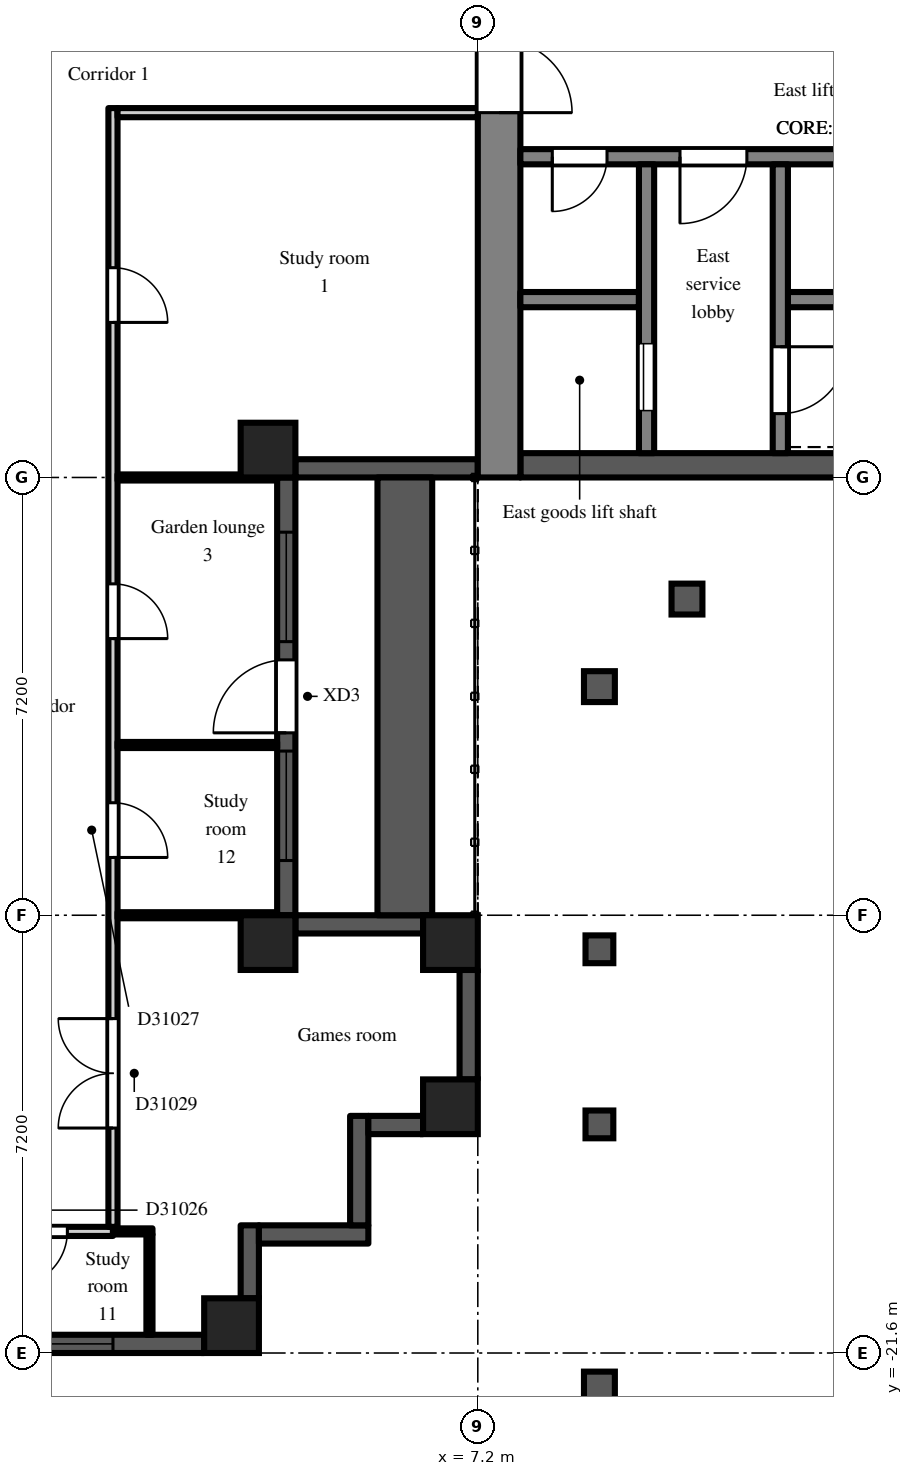
"""IFC4 building model, lengths in metres.
Left out: names, types, materials, properties, quantities, classifications, styles, units other than length and angle.
Written with IfcOpenShell. Run it as: python <this file> out.ifc"""

import sys

from ifc_helpers import new_model, si_unit, direction, frame, frame_2d, origin, origin_2d, place, context, subcontext, project, spatial, rectangle, extrude, element, fill, save


model = new_model("IFC4")
c1 = context("Model", 3, precision=1e-05, world=origin(), true_north=direction((0.0, 1.0)))
c2 = subcontext(c1, "Body", "Model", "MODEL_VIEW")
j1 = project(units=[si_unit("LENGTHUNIT", "METRE"), si_unit("PLANEANGLEUNIT", "RADIAN")], contexts=[c1])
p1 = place(None, origin())
s1 = spatial("IfcSite", under=j1, at=p1, CompositionType="ELEMENT")
p2 = place(p1, origin())
s2 = spatial("IfcBuilding", under=s1, at=p2, CompositionType="ELEMENT")
p3 = place(p2, frame((0.0, 0.0, 216.9)))
s3 = spatial("IfcBuildingStorey", under=s2, at=p3, CompositionType="ELEMENT", Elevation=216.9)
for number, where, z_axis, x_axis in (
    (1, (3.15, -21.15, 0.0), (0.0, 0.0, 1.0), (1.0, 0.0, 0.0)),
    (2, (3.75, -14.85, 0.0), (0.0, 0.0, 1.0), (1.0, 0.0, 0.0)),
    (3, (3.75, -6.75, 0.0), (0.0, 0.0, 1.0), (1.0, 0.0, 0.0)),
    (4, (6.75, -17.55, 0.0), (0.0, 0.0, 1.0), (1.0, 0.0, 0.0)),
    (5, (6.75, -14.85, 0.0), (0.0, 0.0, 1.0), (1.0, 0.0, 0.0)),
):
    element("IfcColumn", number, at=place(p3, frame(where, z_axis=z_axis, x_axis=x_axis)), inside=s3, PredefinedType="COLUMN", context=c2, shape_type="SweptSolid", body=[
        extrude(rectangle(XDim=0.9, YDim=0.9, at=origin_2d()), origin(), (0.0, 0.0, 1.0), 3.0),
    ])
p4 = place(p3, frame((-2.7, -21.45, 0.0), z_axis=(0.0, 0.0, 1.0), x_axis=(1.0, 0.0, 0.0)))
e6 = element("IfcWall", 6, at=p4, inside=s3, PredefinedType="SOLIDWALL", context=c2, shape_type="SweptSolid", body=[
    extrude(rectangle(XDim=5.4, YDim=0.3, at=frame_2d((2.7, 0.0))), origin(), (0.0, 0.0, 1.0), 2.3),
])
p5 = place(p4, frame((1.5, 0.0, 0.2)))
e7 = element("IfcOpeningElement", 7, at=p5, cuts=e6, PredefinedType="OPENING", context=c2, shape_type="SweptSolid", body=[
    extrude(rectangle(XDim=2.4, YDim=1.85, at=frame_2d((1.2, 0.925))), frame((0.0, 0.16, 0.0), z_axis=(0.0, -1.0, 0.0), x_axis=(1.0, 0.0, 0.0)), (0.0, 0.0, 1.0), 0.32),
])
p6 = place(p3, frame((3.45, -20.7, 0.0), z_axis=(0.0, 0.0, 1.0), x_axis=(0.0, 1.0, 0.0)))
e8 = element("IfcWall", 8, at=p6, inside=s3, PredefinedType="SOLIDWALL", context=c2, shape_type="SweptSolid", body=[
    extrude(rectangle(XDim=1.2, YDim=0.3, at=frame_2d((0.6, 0.0))), origin(), (0.0, 0.0, 1.0), 2.6),
])
p7 = place(p3, frame((3.6, -19.65, 0.0), z_axis=(0.0, 0.0, 1.0), x_axis=(1.0, 0.0, 0.0)))
e9 = element("IfcWall", 9, at=p7, inside=s3, PredefinedType="SOLIDWALL", context=c2, shape_type="SweptSolid", body=[
    extrude(rectangle(XDim=1.8, YDim=0.3, at=frame_2d((0.9, 0.0))), origin(), (0.0, 0.0, 1.0), 2.6),
])
p8 = place(p3, frame((5.25, -19.5, 0.0), z_axis=(0.0, 0.0, 1.0), x_axis=(0.0, 1.0, 0.0)))
e10 = element("IfcWall", 10, at=p8, inside=s3, PredefinedType="SOLIDWALL", context=c2, shape_type="SweptSolid", body=[
    extrude(rectangle(XDim=1.8, YDim=0.3, at=frame_2d((0.9, 0.0))), origin(), (0.0, 0.0, 1.0), 2.6),
])
p9 = place(p3, frame((5.4, -17.85, 0.0), z_axis=(0.0, 0.0, 1.0), x_axis=(1.0, 0.0, 0.0)))
e11 = element("IfcWall", 11, at=p9, inside=s3, PredefinedType="SOLIDWALL", context=c2, shape_type="SweptSolid", body=[
    extrude(rectangle(XDim=0.9, YDim=0.3, at=frame_2d((0.45, 0.0))), origin(), (0.0, 0.0, 1.0), 2.6),
])
p10 = place(p3, frame((7.05, -17.1, 0.0), z_axis=(0.0, 0.0, 1.0), x_axis=(0.0, 1.0, 0.0)))
e12 = element("IfcWall", 12, at=p10, inside=s3, PredefinedType="SOLIDWALL", context=c2, shape_type="SweptSolid", body=[
    extrude(rectangle(XDim=1.8, YDim=0.3, at=frame_2d((0.9, 0.0))), origin(), (0.0, 0.0, 1.0), 2.3),
])
p11 = place(p3, frame((6.3, -14.55, 0.0), z_axis=(0.0, 0.0, 1.0), x_axis=(-1.0, 0.0, 0.0)))
e13 = element("IfcWall", 13, at=p11, inside=s3, PredefinedType="SOLIDWALL", context=c2, shape_type="SweptSolid", body=[
    extrude(rectangle(XDim=2.1, YDim=0.3, at=frame_2d((1.05, 0.0))), origin(), (0.0, 0.0, 1.0), 2.3),
])
p12 = place(p3, frame((4.05, -14.4, 0.0), z_axis=(0.0, 0.0, 1.0), x_axis=(0.0, 1.0, 0.0)))
e14 = element("IfcWall", 14, at=p12, inside=s3, PredefinedType="SOLIDWALL", context=c2, shape_type="SweptSolid", body=[
    extrude(rectangle(XDim=7.2, YDim=0.3, at=frame_2d((3.6, 0.0))), origin(), (0.0, 0.0, 1.0), 2.3),
])
p13 = place(p12, frame((3.0, 0.0, 0.0)))
e15 = element("IfcOpeningElement", 15, at=p13, cuts=e14, PredefinedType="OPENING", context=c2, shape_type="SweptSolid", body=[
    extrude(rectangle(XDim=1.2, YDim=2.05, at=frame_2d((0.6, 1.025))), frame((0.0, 0.16, 0.0), z_axis=(0.0, -1.0, 0.0), x_axis=(1.0, 0.0, 0.0)), (0.0, 0.0, 1.0), 0.32),
])
p14 = place(p12, frame((0.9, 0.0, 0.2)))
e16 = element("IfcOpeningElement", 16, at=p14, cuts=e14, PredefinedType="OPENING", context=c2, shape_type="SweptSolid", body=[
    extrude(rectangle(XDim=1.8, YDim=1.85, at=frame_2d((0.9, 0.925))), frame((0.0, 0.16, 0.0), z_axis=(0.0, -1.0, 0.0), x_axis=(1.0, 0.0, 0.0)), (0.0, 0.0, 1.0), 0.32),
])
p15 = place(p12, frame((4.5, 0.0, 0.2)))
e17 = element("IfcOpeningElement", 17, at=p15, cuts=e14, PredefinedType="OPENING", context=c2, shape_type="SweptSolid", body=[
    extrude(rectangle(XDim=1.8, YDim=1.85, at=frame_2d((0.9, 0.925))), frame((0.0, 0.16, 0.0), z_axis=(0.0, -1.0, 0.0), x_axis=(1.0, 0.0, 0.0)), (0.0, 0.0, 1.0), 0.32),
])
p16 = place(p3, frame((4.2, -7.05, 0.0), z_axis=(0.0, 0.0, 1.0), x_axis=(1.0, 0.0, 0.0)))
e18 = element("IfcWall", 18, at=p16, inside=s3, PredefinedType="SOLIDWALL", context=c2, shape_type="SweptSolid", body=[
    extrude(rectangle(XDim=3.0, YDim=0.3, at=frame_2d((1.5, 0.0))), origin(), (0.0, 0.0, 1.0), 2.3),
])
p17 = place(p3, frame((6.0, -14.4, 0.0), z_axis=(0.0, 0.0, 1.0), x_axis=(0.0, 1.0, 0.0)))
e19 = element("IfcWall", 19, at=p17, inside=s3, PredefinedType="PARAPET", context=c2, shape_type="SweptSolid", body=[
    extrude(rectangle(XDim=7.2, YDim=0.9, at=frame_2d((3.6, 0.0))), origin(), (0.0, 0.0, 1.0), 0.8),
])
p18 = place(p3, frame((7.55, -7.2, 0.0), z_axis=(0.0, 0.0, 1.0), x_axis=(0.0, 1.0, 0.0)))
e20 = element("IfcWall", 20, at=p18, inside=s3, PredefinedType="SHEAR", context=c2, shape_type="SweptSolid", body=[
    extrude(rectangle(XDim=14.4, YDim=0.7, at=frame_2d((7.2, 0.0))), origin(), (0.0, 0.0, 1.0), 2.6),
])
p19 = place(p18, frame((6.0, 0.0, 0.0)))
e21 = element("IfcOpeningElement", 21, at=p19, cuts=e20, PredefinedType="OPENING", context=c2, shape_type="SweptSolid", body=[
    extrude(rectangle(XDim=2.4, YDim=2.2, at=frame_2d((1.2, 1.1))), frame((0.0, 0.36, 0.0), z_axis=(0.0, -1.0, 0.0), x_axis=(1.0, 0.0, 0.0)), (0.0, 0.0, 1.0), 0.72),
])
p20 = place(p3, frame((7.9, -7.0, 0.0), z_axis=(0.0, 0.0, 1.0), x_axis=(1.0, 0.0, 0.0)))
e22 = element("IfcWall", 22, at=p20, inside=s3, PredefinedType="SHEAR", context=c2, shape_type="SweptSolid", body=[
    extrude(rectangle(XDim=12.95, YDim=0.4, at=frame_2d((6.475, 0.0))), origin(), (0.0, 0.0, 1.0), 2.6),
])
p21 = place(p3, frame((7.9, -1.925, 0.0), z_axis=(0.0, 0.0, 1.0), x_axis=(1.0, 0.0, 0.0)))
e23 = element("IfcWall", 23, at=p21, inside=s3, PredefinedType="SHEAR", context=c2, shape_type="SweptSolid", body=[
    extrude(rectangle(XDim=12.95, YDim=0.25, at=frame_2d((6.475, 0.0))), origin(), (0.0, 0.0, 1.0), 2.6),
])
p22 = place(p21, frame((0.525, 0.0, 0.0)))
e24 = element("IfcOpeningElement", 24, at=p22, cuts=e23, PredefinedType="OPENING", context=c2, shape_type="SweptSolid", body=[
    extrude(rectangle(XDim=0.9, YDim=2.1, at=frame_2d((0.45, 1.05))), frame((0.0, 0.135, 0.0), z_axis=(0.0, -1.0, 0.0), x_axis=(1.0, 0.0, 0.0)), (0.0, 0.0, 1.0), 0.27),
])
p23 = place(p21, frame((2.625, 0.0, 0.0)))
e25 = element("IfcOpeningElement", 25, at=p23, cuts=e23, PredefinedType="OPENING", context=c2, shape_type="SweptSolid", body=[
    extrude(rectangle(XDim=1.1, YDim=2.1, at=frame_2d((0.55, 1.05))), frame((0.0, 0.135, 0.0), z_axis=(0.0, -1.0, 0.0), x_axis=(1.0, 0.0, 0.0)), (0.0, 0.0, 1.0), 0.27),
])
p24 = place(p21, frame((8.225, 0.0, 0.0)))
e26 = element("IfcOpeningElement", 26, at=p24, cuts=e23, PredefinedType="OPENING", context=c2, shape_type="SweptSolid", body=[
    extrude(rectangle(XDim=0.9, YDim=2.1, at=frame_2d((0.45, 1.05))), frame((0.0, 0.135, 0.0), z_axis=(0.0, -1.0, 0.0), x_axis=(1.0, 0.0, 0.0)), (0.0, 0.0, 1.0), 0.27),
])
p25 = place(p3, frame((7.9, -4.275, 0.0), z_axis=(0.0, 0.0, 1.0), x_axis=(1.0, 0.0, 0.0)))
e27 = element("IfcWall", 27, at=p25, inside=s3, PredefinedType="SHEAR", context=c2, shape_type="SweptSolid", body=[
    extrude(rectangle(XDim=1.95, YDim=0.25, at=frame_2d((0.975, 0.0))), origin(), (0.0, 0.0, 1.0), 2.6),
])
p26 = place(p3, frame((12.3, -4.275, 0.0), z_axis=(0.0, 0.0, 1.0), x_axis=(1.0, 0.0, 0.0)))
e28 = element("IfcWall", 28, at=p26, inside=s3, PredefinedType="SHEAR", context=c2, shape_type="SweptSolid", body=[
    extrude(rectangle(XDim=8.55, YDim=0.25, at=frame_2d((4.275, 0.0))), origin(), (0.0, 0.0, 1.0), 2.6),
])
p27 = place(p3, frame((9.975, -2.05, 0.0), z_axis=(0.0, 0.0, 1.0), x_axis=(0.0, -1.0, 0.0)))
e29 = element("IfcWall", 29, at=p27, inside=s3, PredefinedType="SHEAR", context=c2, shape_type="SweptSolid", body=[
    extrude(rectangle(XDim=4.75, YDim=0.25, at=frame_2d((2.375, 0.0))), origin(), (0.0, 0.0, 1.0), 2.6),
])
p28 = place(p27, frame((2.95, 0.0, 0.0)))
e30 = element("IfcOpeningElement", 30, at=p28, cuts=e29, PredefinedType="OPENING", context=c2, shape_type="SweptSolid", body=[
    extrude(rectangle(XDim=1.1, YDim=2.1, at=frame_2d((0.55, 1.05))), frame((0.0, 0.135, 0.0), z_axis=(0.0, -1.0, 0.0), x_axis=(1.0, 0.0, 0.0)), (0.0, 0.0, 1.0), 0.27),
])
p29 = place(p3, frame((12.175, -2.05, 0.0), z_axis=(0.0, 0.0, 1.0), x_axis=(0.0, -1.0, 0.0)))
e31 = element("IfcWall", 31, at=p29, inside=s3, PredefinedType="SHEAR", context=c2, shape_type="SweptSolid", body=[
    extrude(rectangle(XDim=4.75, YDim=0.25, at=frame_2d((2.375, 0.0))), origin(), (0.0, 0.0, 1.0), 2.6),
])
p30 = place(p29, frame((3.0, 0.0, 0.0)))
e32 = element("IfcOpeningElement", 32, at=p30, cuts=e31, PredefinedType="OPENING", context=c2, shape_type="SweptSolid", body=[
    extrude(rectangle(XDim=1.1, YDim=2.1, at=frame_2d((0.55, 1.05))), frame((0.0, 0.135, 0.0), z_axis=(0.0, -1.0, 0.0), x_axis=(1.0, 0.0, 0.0)), (0.0, 0.0, 1.0), 0.27),
])
p31 = place(p3, frame((-1.2, -19.6, 0.0), z_axis=(0.0, 0.0, 1.0), x_axis=(1.0, 0.0, 0.0)))
e33 = element("IfcWall", 33, at=p31, inside=s3, PredefinedType="PARTITIONING", context=c2, shape_type="SweptSolid", body=[
    extrude(rectangle(XDim=2.4, YDim=0.15, at=frame_2d((1.2, 0.0))), origin(), (0.0, 0.0, 1.0), 2.6),
])
p32 = place(p31, frame((0.75, 0.0, 0.0)))
e34 = element("IfcOpeningElement", 34, at=p32, cuts=e33, PredefinedType="OPENING", context=c2, shape_type="SweptSolid", body=[
    extrude(rectangle(XDim=0.9, YDim=2.1, at=frame_2d((0.45, 1.05))), frame((0.0, 0.085, 0.0), z_axis=(0.0, -1.0, 0.0), x_axis=(1.0, 0.0, 0.0)), (0.0, 0.0, 1.0), 0.17),
])
p33 = place(p3, frame((1.2, -19.525, 0.0), z_axis=(0.0, 0.0, 1.0), x_axis=(0.0, 1.0, 0.0)))
e35 = element("IfcWall", 35, at=p33, inside=s3, PredefinedType="PARTITIONING", context=c2, shape_type="SweptSolid", body=[
    extrude(rectangle(XDim=18.4, YDim=0.15, at=frame_2d((9.2, 0.0))), origin(), (0.0, 0.0, 1.0), 2.6),
])
p34 = place(p33, frame((14.875, 0.0, 0.0)))
e36 = element("IfcOpeningElement", 36, at=p34, cuts=e35, PredefinedType="OPENING", context=c2, shape_type="SweptSolid", body=[
    extrude(rectangle(XDim=0.9, YDim=2.1, at=frame_2d((0.45, 1.05))), frame((0.0, 0.085, 0.0), z_axis=(0.0, -1.0, 0.0), x_axis=(1.0, 0.0, 0.0)), (0.0, 0.0, 1.0), 0.17),
])
p35 = place(p33, frame((6.075, 0.0, 0.0)))
e37 = element("IfcOpeningElement", 37, at=p35, cuts=e35, PredefinedType="OPENING", context=c2, shape_type="SweptSolid", body=[
    extrude(rectangle(XDim=0.9, YDim=2.1, at=frame_2d((0.45, 1.05))), frame((0.0, 0.085, 0.0), z_axis=(0.0, -1.0, 0.0), x_axis=(1.0, 0.0, 0.0)), (0.0, 0.0, 1.0), 0.17),
])
p36 = place(p33, frame((9.675, 0.0, 0.0)))
e38 = element("IfcOpeningElement", 38, at=p36, cuts=e35, PredefinedType="OPENING", context=c2, shape_type="SweptSolid", body=[
    extrude(rectangle(XDim=0.9, YDim=2.1, at=frame_2d((0.45, 1.05))), frame((0.0, 0.085, 0.0), z_axis=(0.0, -1.0, 0.0), x_axis=(1.0, 0.0, 0.0)), (0.0, 0.0, 1.0), 0.17),
])
p37 = place(p33, frame((1.625, 0.0, 0.0)))
e39 = element("IfcOpeningElement", 39, at=p37, cuts=e35, PredefinedType="OPENING", context=c2, shape_type="SweptSolid", body=[
    extrude(rectangle(XDim=1.8, YDim=2.1, at=frame_2d((0.9, 1.05))), frame((0.0, 0.085, 0.0), z_axis=(0.0, -1.0, 0.0), x_axis=(1.0, 0.0, 0.0)), (0.0, 0.0, 1.0), 0.17),
])
p38 = place(p3, frame((1.2, -19.6, 0.0), z_axis=(0.0, 0.0, 1.0), x_axis=(1.0, 0.0, 0.0)))
e40 = element("IfcWall", 40, at=p38, inside=s3, PredefinedType="PARTITIONING", context=c2, shape_type="SweptSolid", body=[
    extrude(rectangle(XDim=0.65, YDim=0.1, at=frame_2d((0.325, 0.0))), origin(), (0.0, 0.0, 1.0), 2.6),
])
for number, where, z_axis, x_axis in (
    (41, (1.275, -14.4, 0.0), (0.0, 0.0, 1.0), (1.0, 0.0, 0.0)),
    (42, (1.275, -11.6, 0.0), (0.0, 0.0, 1.0), (1.0, 0.0, 0.0)),
    (43, (1.275, -7.2, 0.0), (0.0, 0.0, 1.0), (1.0, 0.0, 0.0)),
):
    element("IfcWall", number, at=place(p3, frame(where, z_axis=z_axis, x_axis=x_axis)), inside=s3, PredefinedType="PARTITIONING", context=c2, shape_type="SweptSolid", body=[
        extrude(rectangle(XDim=2.625, YDim=0.1, at=frame_2d((1.312, 0.0))), origin(), (0.0, 0.0, 1.0), 2.6),
    ])
p39 = place(p3, frame((1.275, -1.2, 0.0), z_axis=(0.0, 0.0, 1.0), x_axis=(1.0, 0.0, 0.0)))
e44 = element("IfcWall", 44, at=p39, inside=s3, PredefinedType="PARTITIONING", context=c2, shape_type="SweptSolid", body=[
    extrude(rectangle(XDim=5.925, YDim=0.15, at=frame_2d((2.962, 0.0))), origin(), (0.0, 0.0, 1.0), 2.6),
])
p40 = place(p3, frame((1.8, -21.3, 0.0), z_axis=(0.0, 0.0, 1.0), x_axis=(0.0, 1.0, 0.0)))
e45 = element("IfcWall", 45, at=p40, inside=s3, PredefinedType="PARTITIONING", context=c2, shape_type="SweptSolid", body=[
    extrude(rectangle(XDim=1.65, YDim=0.1, at=frame_2d((0.825, 0.0))), origin(), (0.0, 0.0, 1.0), 2.6),
])
p41 = place(p5, origin())
e46 = element("IfcWindow", 46, at=p41, inside=s3, PartitioningType="SINGLE_PANEL", PredefinedType="WINDOW", context=c2, shape_type="SweptSolid", body=[
    extrude(rectangle(XDim=2.4, YDim=1.85, at=frame_2d((1.2, 0.925))), frame((0.0, 0.03, 0.0), z_axis=(0.0, -1.0, 0.0), x_axis=(1.0, 0.0, 0.0)), (0.0, 0.0, 1.0), 0.06),
])
fill(e7, e46)
p42 = place(p13, origin())
e47 = element("IfcDoor", 47, at=p42, inside=s3, OperationType="SINGLE_SWING_LEFT", PredefinedType="DOOR", context=c2, shape_type="SweptSolid", body=[
    extrude(rectangle(XDim=1.2, YDim=2.05, at=frame_2d((0.6, 1.025))), frame((0.0, 0.025, 0.0), z_axis=(0.0, -1.0, 0.0), x_axis=(1.0, 0.0, 0.0)), (0.0, 0.0, 1.0), 0.05),
])
fill(e15, e47)
p43 = place(p14, origin())
e48 = element("IfcWindow", 48, at=p43, inside=s3, PartitioningType="SINGLE_PANEL", PredefinedType="WINDOW", context=c2, shape_type="SweptSolid", body=[
    extrude(rectangle(XDim=1.8, YDim=1.85, at=frame_2d((0.9, 0.925))), frame((0.0, 0.03, 0.0), z_axis=(0.0, -1.0, 0.0), x_axis=(1.0, 0.0, 0.0)), (0.0, 0.0, 1.0), 0.06),
])
fill(e16, e48)
p44 = place(p15, origin())
e49 = element("IfcWindow", 49, at=p44, inside=s3, PartitioningType="SINGLE_PANEL", PredefinedType="WINDOW", context=c2, shape_type="SweptSolid", body=[
    extrude(rectangle(XDim=1.8, YDim=1.85, at=frame_2d((0.9, 0.925))), frame((0.0, 0.03, 0.0), z_axis=(0.0, -1.0, 0.0), x_axis=(1.0, 0.0, 0.0)), (0.0, 0.0, 1.0), 0.06),
])
fill(e17, e49)
p45 = place(p28, origin())
e50 = element("IfcDoor", 50, at=p45, inside=s3, OperationType="SLIDING_TO_LEFT", PredefinedType="DOOR", context=c2, shape_type="SweptSolid", body=[
    extrude(rectangle(XDim=1.1, YDim=2.1, at=frame_2d((0.55, 1.05))), frame((0.0, 0.025, 0.0), z_axis=(0.0, -1.0, 0.0), x_axis=(1.0, 0.0, 0.0)), (0.0, 0.0, 1.0), 0.05),
])
fill(e30, e50)
p46 = place(p30, origin())
e51 = element("IfcDoor", 51, at=p46, inside=s3, OperationType="SINGLE_SWING_LEFT", PredefinedType="DOOR", context=c2, shape_type="SweptSolid", body=[
    extrude(rectangle(XDim=1.1, YDim=2.1, at=frame_2d((0.55, 1.05))), frame((0.0, 0.025, 0.0), z_axis=(0.0, -1.0, 0.0), x_axis=(1.0, 0.0, 0.0)), (0.0, 0.0, 1.0), 0.05),
])
fill(e32, e51)
p47 = place(p22, frame((0.9, 0.0, 0.0), z_axis=(0.0, 0.0, 1.0), x_axis=(-1.0, 0.0, 0.0)))
e52 = element("IfcDoor", 52, at=p47, inside=s3, OperationType="SINGLE_SWING_RIGHT", PredefinedType="DOOR", context=c2, shape_type="SweptSolid", body=[
    extrude(rectangle(XDim=0.9, YDim=2.1, at=frame_2d((0.45, 1.05))), frame((0.0, 0.025, 0.0), z_axis=(0.0, -1.0, 0.0), x_axis=(1.0, 0.0, 0.0)), (0.0, 0.0, 1.0), 0.05),
])
fill(e24, e52)
p48 = place(p23, frame((1.1, 0.0, 0.0), z_axis=(0.0, 0.0, 1.0), x_axis=(-1.0, 0.0, 0.0)))
e53 = element("IfcDoor", 53, at=p48, inside=s3, OperationType="SINGLE_SWING_RIGHT", PredefinedType="DOOR", context=c2, shape_type="SweptSolid", body=[
    extrude(rectangle(XDim=1.1, YDim=2.1, at=frame_2d((0.55, 1.05))), frame((0.0, 0.025, 0.0), z_axis=(0.0, -1.0, 0.0), x_axis=(1.0, 0.0, 0.0)), (0.0, 0.0, 1.0), 0.05),
])
fill(e25, e53)
p49 = place(p19, frame((2.4, 0.0, 0.0), z_axis=(0.0, 0.0, 1.0), x_axis=(-1.0, 0.0, 0.0)))
e54 = element("IfcDoor", 54, at=p49, inside=s3, OperationType="DOUBLE_DOOR_DOUBLE_SWING", PredefinedType="DOOR", context=c2, shape_type="SweptSolid", body=[
    extrude(rectangle(XDim=2.4, YDim=2.2, at=frame_2d((1.2, 1.1))), frame((0.0, 0.025, 0.0), z_axis=(0.0, -1.0, 0.0), x_axis=(1.0, 0.0, 0.0)), (0.0, 0.0, 1.0), 0.05),
])
fill(e21, e54)
p50 = place(p34, frame((0.9, 0.0, 0.0), z_axis=(0.0, 0.0, 1.0), x_axis=(-1.0, 0.0, 0.0)))
e55 = element("IfcDoor", 55, at=p50, inside=s3, OperationType="SINGLE_SWING_RIGHT", PredefinedType="DOOR", context=c2, shape_type="SweptSolid", body=[
    extrude(rectangle(XDim=0.9, YDim=2.1, at=frame_2d((0.45, 1.05))), frame((0.0, 0.025, 0.0), z_axis=(0.0, -1.0, 0.0), x_axis=(1.0, 0.0, 0.0)), (0.0, 0.0, 1.0), 0.05),
])
fill(e36, e55)
p51 = place(p32, frame((0.9, 0.0, 0.0), z_axis=(0.0, 0.0, 1.0), x_axis=(-1.0, 0.0, 0.0)))
e56 = element("IfcDoor", 56, at=p51, inside=s3, OperationType="SINGLE_SWING_RIGHT", PredefinedType="DOOR", context=c2, shape_type="SweptSolid", body=[
    extrude(rectangle(XDim=0.9, YDim=2.1, at=frame_2d((0.45, 1.05))), frame((0.0, 0.025, 0.0), z_axis=(0.0, -1.0, 0.0), x_axis=(1.0, 0.0, 0.0)), (0.0, 0.0, 1.0), 0.05),
])
fill(e34, e56)
p52 = place(p35, frame((0.9, 0.0, 0.0), z_axis=(0.0, 0.0, 1.0), x_axis=(-1.0, 0.0, 0.0)))
e57 = element("IfcDoor", 57, at=p52, inside=s3, OperationType="SINGLE_SWING_RIGHT", PredefinedType="DOOR", context=c2, shape_type="SweptSolid", body=[
    extrude(rectangle(XDim=0.9, YDim=2.1, at=frame_2d((0.45, 1.05))), frame((0.0, 0.025, 0.0), z_axis=(0.0, -1.0, 0.0), x_axis=(1.0, 0.0, 0.0)), (0.0, 0.0, 1.0), 0.05),
])
fill(e37, e57)
p53 = place(p36, frame((0.9, 0.0, 0.0), z_axis=(0.0, 0.0, 1.0), x_axis=(-1.0, 0.0, 0.0)))
e58 = element("IfcDoor", 58, at=p53, inside=s3, OperationType="SINGLE_SWING_RIGHT", PredefinedType="DOOR", context=c2, shape_type="SweptSolid", body=[
    extrude(rectangle(XDim=0.9, YDim=2.1, at=frame_2d((0.45, 1.05))), frame((0.0, 0.025, 0.0), z_axis=(0.0, -1.0, 0.0), x_axis=(1.0, 0.0, 0.0)), (0.0, 0.0, 1.0), 0.05),
])
fill(e38, e58)
p54 = place(p37, origin())
e59 = element("IfcDoor", 59, at=p54, inside=s3, OperationType="DOUBLE_DOOR_DOUBLE_SWING", PredefinedType="DOOR", context=c2, shape_type="SweptSolid", body=[
    extrude(rectangle(XDim=1.8, YDim=2.1, at=frame_2d((0.9, 1.05))), frame((0.0, 0.025, 0.0), z_axis=(0.0, -1.0, 0.0), x_axis=(1.0, 0.0, 0.0)), (0.0, 0.0, 1.0), 0.05),
])
fill(e39, e59)
save(model, sys.argv[1])
